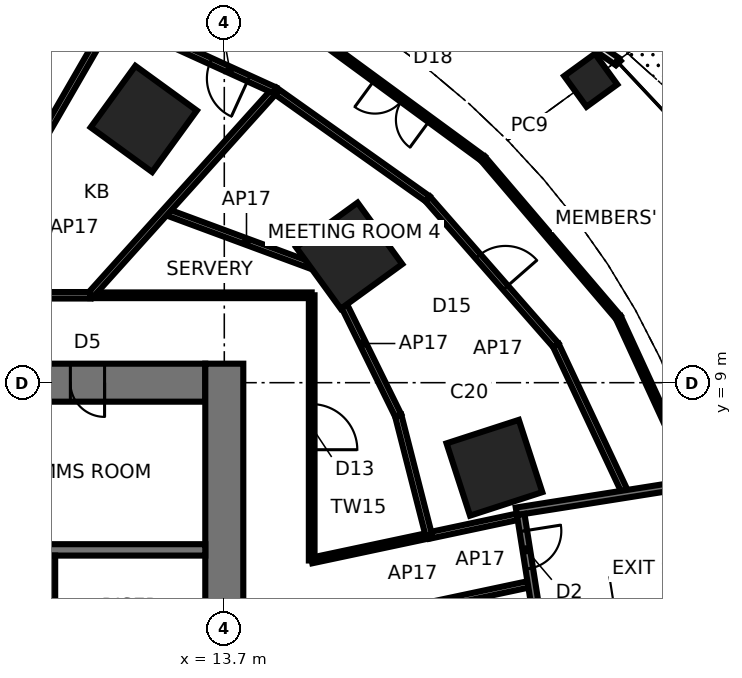
"""IFC4 building model, lengths in metres.
Left out: names, types, materials, properties, quantities, classifications, styles, units other than length and angle.
Written with IfcOpenShell. Run it as: python <this file> out.ifc"""

import sys

from ifc_helpers import new_model, si_unit, direction, frame, frame_2d, origin, origin_2d, place, context, subcontext, project, spatial, rectangle, extrude, element, fill, save


model = new_model("IFC4")
c1 = context("Model", 3, precision=1e-05, world=origin(), true_north=direction((0.0, 1.0)))
c2 = subcontext(c1, "Body", "Model", "MODEL_VIEW")
j1 = project(units=[si_unit("LENGTHUNIT", "METRE"), si_unit("PLANEANGLEUNIT", "RADIAN")], contexts=[c1])
p1 = place(None, origin())
s1 = spatial("IfcSite", under=j1, at=p1, CompositionType="ELEMENT")
p2 = place(p1, origin())
s2 = spatial("IfcBuilding", under=s1, at=p2, CompositionType="ELEMENT")
p3 = place(p2, frame((0.0, 0.0, 15.1)))
s3 = spatial("IfcBuildingStorey", under=s2, at=p3, CompositionType="ELEMENT", Elevation=15.1)
for number, where, z_axis, x_axis in (
    (1, (20.808, 6.761, 0.0), (0.0, 0.0, 1.0), (0.951, 0.309, 0.0)),
    (2, (16.986, 12.341, 0.0), (0.0, 0.0, 1.0), (0.809, 0.588, 0.0)),
    (3, (11.581, 15.94, 0.0), (0.0, 0.0, 1.0), (0.588, 0.809, 0.0)),
):
    element("IfcColumn", number, at=place(p3, frame(where, z_axis=z_axis, x_axis=x_axis)), inside=s3, PredefinedType="COLUMN", context=c2, shape_type="SweptSolid", body=[
        extrude(rectangle(XDim=2.0, YDim=2.0, at=origin_2d()), origin(), (0.0, 0.0, 1.0), 4.5),
    ])
p4 = place(p3, frame((23.342, 16.959, 0.0), z_axis=(0.0, 0.0, 1.0), x_axis=(0.809016994375, 0.587785252292, 0.0)))
e4 = element("IfcColumn", 4, at=p4, inside=s3, PredefinedType="COLUMN", context=c2, shape_type="SweptSolid", body=[
    extrude(rectangle(XDim=1.0, YDim=1.0, at=origin_2d()), origin(), (0.0, 0.0, 1.0), 4.5),
])
p5 = place(p3, frame((13.2, 9.0, 0.0), z_axis=(0.0, 0.0, 1.0), x_axis=(-1.0, 0.0, 0.0)))
e5 = element("IfcWall", 5, at=p5, inside=s3, PredefinedType="SHEAR", context=c2, shape_type="SweptSolid", body=[
    extrude(rectangle(XDim=26.4, YDim=1.0, at=frame_2d((13.2, 0.0))), origin(), (0.0, 0.0, 1.0), 4.5),
])
p6 = place(p5, frame((2.65, 0.0, 0.0)))
e6 = element("IfcOpeningElement", 6, at=p6, cuts=e5, PredefinedType="OPENING", context=c2, shape_type="SweptSolid", body=[
    extrude(rectangle(XDim=0.9, YDim=2.1, at=frame_2d((0.45, 1.05))), frame((0.0, 0.51, 0.0), z_axis=(0.0, -1.0, 0.0), x_axis=(1.0, 0.0, 0.0)), (0.0, 0.0, 1.0), 1.02),
])
p7 = place(p5, frame((9.5, 0.0, 0.0)))
e7 = element("IfcOpeningElement", 7, at=p7, cuts=e5, PredefinedType="OPENING", context=c2, shape_type="SweptSolid", body=[
    extrude(rectangle(XDim=0.9, YDim=2.1, at=frame_2d((0.45, 1.05))), frame((0.0, 0.51, 0.0), z_axis=(0.0, -1.0, 0.0), x_axis=(1.0, 0.0, 0.0)), (0.0, 0.0, 1.0), 1.02),
])
p8 = place(p5, frame((16.0, 0.0, 0.0)))
e8 = element("IfcOpeningElement", 8, at=p8, cuts=e5, PredefinedType="OPENING", context=c2, shape_type="SweptSolid", body=[
    extrude(rectangle(XDim=0.9, YDim=2.1, at=frame_2d((0.45, 1.05))), frame((0.0, 0.51, 0.0), z_axis=(0.0, -1.0, 0.0), x_axis=(1.0, 0.0, 0.0)), (0.0, 0.0, 1.0), 1.02),
])
p9 = place(p5, frame((21.25, 0.0, 0.0)))
e9 = element("IfcOpeningElement", 9, at=p9, cuts=e5, PredefinedType="OPENING", context=c2, shape_type="SweptSolid", body=[
    extrude(rectangle(XDim=0.9, YDim=2.1, at=frame_2d((0.45, 1.05))), frame((0.0, 0.51, 0.0), z_axis=(0.0, -1.0, 0.0), x_axis=(1.0, 0.0, 0.0)), (0.0, 0.0, 1.0), 1.02),
])
p10 = place(p5, frame((24.8, 0.0, 0.0)))
e10 = element("IfcOpeningElement", 10, at=p10, cuts=e5, PredefinedType="OPENING", context=c2, shape_type="SweptSolid", body=[
    extrude(rectangle(XDim=1.0, YDim=2.1, at=frame_2d((0.5, 1.05))), frame((0.0, 0.51, 0.0), z_axis=(0.0, -1.0, 0.0), x_axis=(1.0, 0.0, 0.0)), (0.0, 0.0, 1.0), 1.02),
])
p11 = place(p3, frame((13.7, -9.5, 0.0), z_axis=(0.0, 0.0, 1.0), x_axis=(0.0, 1.0, 0.0)))
e11 = element("IfcWall", 11, at=p11, inside=s3, PredefinedType="SHEAR", context=c2, shape_type="SweptSolid", body=[
    extrude(rectangle(XDim=19.0, YDim=1.0, at=frame_2d((9.5, 0.0))), origin(), (0.0, 0.0, 1.0), 4.5),
])
p12 = place(p11, frame((8.6, 0.0, 0.0)))
e12 = element("IfcOpeningElement", 12, at=p12, cuts=e11, PredefinedType="OPENING", context=c2, shape_type="SweptSolid", body=[
    extrude(rectangle(XDim=1.8, YDim=2.4, at=frame_2d((0.9, 1.2))), frame((0.0, 0.51, 0.0), z_axis=(0.0, -1.0, 0.0), x_axis=(1.0, 0.0, 0.0)), (0.0, 0.0, 1.0), 1.02),
])
p13 = place(p3, frame((-13.2, 4.6, 0.0), z_axis=(0.0, 0.0, 1.0), x_axis=(1.0, 0.0, 0.0)))
e13 = element("IfcWall", 13, at=p13, inside=s3, PredefinedType="SHEAR", context=c2, shape_type="SweptSolid", body=[
    extrude(rectangle(XDim=26.4, YDim=0.3, at=frame_2d((13.2, 0.0))), origin(), (0.0, 0.0, 1.0), 4.5),
])
p14 = place(p3, frame((9.1, 1.75, 0.0), z_axis=(0.0, 0.0, 1.0), x_axis=(0.0, 1.0, 0.0)))
e14 = element("IfcWall", 14, at=p14, inside=s3, PredefinedType="SHEAR", context=c2, shape_type="SweptSolid", body=[
    extrude(rectangle(XDim=2.7, YDim=0.3, at=frame_2d((1.35, 0.0))), origin(), (0.0, 0.0, 1.0), 4.5),
])
p15 = place(p3, frame((24.03, 17.459, 0.0), z_axis=(0.0, 0.0, 1.0), x_axis=(-0.821240808498, 0.570581750897, 0.0)))
e15 = element("IfcWall", 15, at=p15, inside=s3, PredefinedType="SOLIDWALL", context=c2, shape_type="SweptSolid", body=[
    extrude(rectangle(XDim=6.225, YDim=0.2, at=frame_2d((3.112, 0.0))), origin(), (0.0, 0.0, 1.0), 4.3),
])
p16 = place(p15, frame((4.825, 0.0, 0.0)))
e16 = element("IfcOpeningElement", 16, at=p16, cuts=e15, PredefinedType="OPENING", context=c2, shape_type="SweptSolid", body=[
    extrude(rectangle(XDim=1.0, YDim=2.4, at=frame_2d((0.5, 1.2))), frame((0.0, 0.11, 0.0), z_axis=(0.0, -1.0, 0.0), x_axis=(1.0, 0.0, 0.0)), (0.0, 0.0, 1.0), 0.22),
])
p17 = place(p15, frame((3.725, 0.0, 0.3)))
e17 = element("IfcOpeningElement", 17, at=p17, cuts=e15, PredefinedType="OPENING", context=c2, shape_type="SweptSolid", body=[
    extrude(rectangle(XDim=0.9, YDim=2.1, at=frame_2d((0.45, 1.05))), frame((0.0, 0.11, 0.0), z_axis=(0.0, -1.0, 0.0), x_axis=(1.0, 0.0, 0.0)), (0.0, 0.0, 1.0), 0.22),
])
p18 = place(p15, frame((4.825, 0.0, 2.7)))
e18 = element("IfcOpeningElement", 18, at=p18, cuts=e15, PredefinedType="OPENING", context=c2, shape_type="SweptSolid", body=[
    extrude(rectangle(XDim=1.0, YDim=0.6, at=frame_2d((0.5, 0.3))), frame((0.0, 0.11, 0.0), z_axis=(0.0, -1.0, 0.0), x_axis=(1.0, 0.0, 0.0)), (0.0, 0.0, 1.0), 0.22),
])
p19 = place(p3, frame((16.0, 2.481, 0.0), z_axis=(0.0, 0.0, 1.0), x_axis=(0.978144448143, 0.207926522038, 0.0)))
e19 = element("IfcWall", 19, at=p19, inside=s3, PredefinedType="PARTITIONING", context=c2, shape_type="SweptSolid", body=[
    extrude(rectangle(XDim=5.817, YDim=0.17, at=frame_2d((2.908, 0.0))), origin(), (0.0, 0.0, 1.0), 4.3),
])
p20 = place(p3, frame((21.408, 5.47, 0.0), z_axis=(0.0, 0.0, 1.0), x_axis=(-0.978137955861, -0.207957061204, 0.0)))
e20 = element("IfcWall", 20, at=p20, inside=s3, PredefinedType="PARTITIONING", context=c2, shape_type="SweptSolid", body=[
    extrude(rectangle(XDim=2.376, YDim=0.17, at=frame_2d((1.188, 0.0))), origin(), (0.0, 0.0, 1.0), 4.3),
])
p21 = place(p3, frame((19.083, 4.976, 0.0), z_axis=(0.0, 0.0, 1.0), x_axis=(-0.978156882567, -0.207868018433, 0.0)))
e21 = element("IfcWall", 21, at=p21, inside=s3, PredefinedType="PARTITIONING", context=c2, shape_type="SweptSolid", body=[
    extrude(rectangle(XDim=3.152, YDim=0.15, at=frame_2d((1.576, 0.0))), origin(), (0.0, 0.0, 1.0), 4.3),
])
p22 = place(p3, frame((26.032, 6.452, 0.0), z_axis=(0.0, 0.0, 1.0), x_axis=(-0.417854101211, 0.908514144139, 0.0)))
e22 = element("IfcWall", 22, at=p22, inside=s3, PredefinedType="PARTITIONING", context=c2, shape_type="SweptSolid", body=[
    extrude(rectangle(XDim=4.695, YDim=0.15, at=frame_2d((2.347, 0.0))), origin(), (0.0, 0.0, 1.0), 4.3),
])
p23 = place(p3, frame((22.426, 9.985, 0.0), z_axis=(0.0, 0.0, 1.0), x_axis=(0.425473889508, -0.904970700822, 0.0)))
e23 = element("IfcWall", 23, at=p23, inside=s3, PredefinedType="PARTITIONING", context=c2, shape_type="SweptSolid", body=[
    extrude(rectangle(XDim=4.221, YDim=0.17, at=frame_2d((2.11, 0.0))), origin(), (0.0, 0.0, 1.0), 4.3),
])
p24 = place(p3, frame((18.276, 8.137, 0.0), z_axis=(0.0, 0.0, 1.0), x_axis=(0.247568605717, -0.968870365665, 0.0)))
e24 = element("IfcWall", 24, at=p24, inside=s3, PredefinedType="PARTITIONING", context=c2, shape_type="SweptSolid", body=[
    extrude(rectangle(XDim=3.262, YDim=0.17, at=frame_2d((1.631, 0.0))), origin(), (0.0, 0.0, 1.0), 4.3),
])
p25 = place(p3, frame((16.0, 4.321, 0.0), z_axis=(0.0, 0.0, 1.0), x_axis=(0.0, 1.0, 0.0)))
e25 = element("IfcWall", 25, at=p25, inside=s3, PredefinedType="PARTITIONING", context=c2, shape_type="SweptSolid", body=[
    extrude(rectangle(XDim=6.979, YDim=0.15, at=frame_2d((3.49, 0.0))), origin(), (0.0, 0.0, 1.0), 4.3),
])
p26 = place(p25, frame((2.915, 0.0, 0.0)))
e26 = element("IfcOpeningElement", 26, at=p26, cuts=e25, PredefinedType="OPENING", context=c2, shape_type="SweptSolid", body=[
    extrude(rectangle(XDim=1.2, YDim=2.4, at=frame_2d((0.6, 1.2))), frame((0.0, 0.085, 0.0), z_axis=(0.0, -1.0, 0.0), x_axis=(1.0, 0.0, 0.0)), (0.0, 0.0, 1.0), 0.17),
])
p27 = place(p3, frame((19.049, 13.84, 0.0), z_axis=(0.0, 0.0, 1.0), x_axis=(0.658801352576, -0.752316939756, 0.0)))
e27 = element("IfcWall", 27, at=p27, inside=s3, PredefinedType="PARTITIONING", context=c2, shape_type="SweptSolid", body=[
    extrude(rectangle(XDim=5.125, YDim=0.17, at=frame_2d((2.562, 0.0))), origin(), (0.0, 0.0, 1.0), 4.3),
])
p28 = place(p27, frame((2.012, 0.0, 0.0)))
e28 = element("IfcOpeningElement", 28, at=p28, cuts=e27, PredefinedType="OPENING", context=c2, shape_type="SweptSolid", body=[
    extrude(rectangle(XDim=1.1, YDim=2.4, at=frame_2d((0.55, 1.2))), frame((0.0, 0.095, 0.0), z_axis=(0.0, -1.0, 0.0), x_axis=(1.0, 0.0, 0.0)), (0.0, 0.0, 1.0), 0.19),
])
p29 = place(p3, frame((24.07, 10.717, 0.0), z_axis=(0.0, 0.0, 1.0), x_axis=(-0.648732488568, 0.761016529569, 0.0)))
e29 = element("IfcWall", 29, at=p29, inside=s3, PredefinedType="PARTITIONING", context=c2, shape_type="SweptSolid", body=[
    extrude(rectangle(XDim=5.494, YDim=0.15, at=frame_2d((2.747, 0.0))), origin(), (0.0, 0.0, 1.0), 4.3),
])
p30 = place(p3, frame((16.413, 11.925, 0.0), z_axis=(0.0, 0.0, 1.0), x_axis=(0.44142043443, -0.897300395669, 0.0)))
e30 = element("IfcWall", 30, at=p30, inside=s3, PredefinedType="PARTITIONING", context=c2, shape_type="SweptSolid", body=[
    extrude(rectangle(XDim=4.221, YDim=0.17, at=frame_2d((2.111, 0.0))), origin(), (0.0, 0.0, 1.0), 4.3),
])
p31 = place(p3, frame((16.0, 11.3, 0.0), z_axis=(0.0, 0.0, 1.0), x_axis=(-1.0, 0.0, 0.0)))
e31 = element("IfcWall", 31, at=p31, inside=s3, PredefinedType="PARTITIONING", context=c2, shape_type="SweptSolid", body=[
    extrude(rectangle(XDim=5.825, YDim=0.15, at=frame_2d((2.913, 0.0))), origin(), (0.0, 0.0, 1.0), 4.3),
])
p32 = place(p3, frame((12.156, 13.5, 0.0), z_axis=(0.0, 0.0, 1.0), x_axis=(0.937814922048, -0.34713566798, 0.0)))
e32 = element("IfcWall", 32, at=p32, inside=s3, PredefinedType="PARTITIONING", context=c2, shape_type="SweptSolid", body=[
    extrude(rectangle(XDim=4.539, YDim=0.17, at=frame_2d((2.27, 0.0))), origin(), (0.0, 0.0, 1.0), 4.3),
])
p33 = place(p3, frame((15.029, 16.692, 0.0), z_axis=(0.0, 0.0, 1.0), x_axis=(0.815613464498, -0.578597162566, 0.0)))
e33 = element("IfcWall", 33, at=p33, inside=s3, PredefinedType="PARTITIONING", context=c2, shape_type="SweptSolid", body=[
    extrude(rectangle(XDim=4.929, YDim=0.17, at=frame_2d((2.464, 0.0))), origin(), (0.0, 0.0, 1.0), 4.3),
])
p34 = place(p3, frame((20.506, 14.898, 0.0), z_axis=(0.0, 0.0, 1.0), x_axis=(-0.806517819775, 0.591209782045, 0.0)))
e34 = element("IfcWall", 34, at=p34, inside=s3, PredefinedType="PARTITIONING", context=c2, shape_type="SweptSolid", body=[
    extrude(rectangle(XDim=5.296, YDim=0.15, at=frame_2d((2.648, 0.0))), origin(), (0.0, 0.0, 1.0), 4.3),
])
p35 = place(p34, frame((1.723, 0.0, 0.0)))
e35 = element("IfcOpeningElement", 35, at=p35, cuts=e34, PredefinedType="OPENING", context=c2, shape_type="SweptSolid", body=[
    extrude(rectangle(XDim=1.8, YDim=2.4, at=frame_2d((0.9, 1.2))), frame((0.0, 0.085, 0.0), z_axis=(0.0, -1.0, 0.0), x_axis=(1.0, 0.0, 0.0)), (0.0, 0.0, 1.0), 0.17),
])
p36 = place(p3, frame((15.029, 16.692, 0.0), z_axis=(0.0, 0.0, 1.0), x_axis=(-0.669122739593, -0.74315190867, 0.0)))
e36 = element("IfcWall", 36, at=p36, inside=s3, PredefinedType="PARTITIONING", context=c2, shape_type="SweptSolid", body=[
    extrude(rectangle(XDim=7.255, YDim=0.17, at=frame_2d((3.628, 0.0))), origin(), (0.0, 0.0, 1.0), 4.3),
])
p37 = place(p3, frame((10.175, 11.3, 0.0), z_axis=(0.0, 0.0, 1.0), x_axis=(-1.0, 0.0, 0.0)))
e37 = element("IfcWall", 37, at=p37, inside=s3, PredefinedType="PARTITIONING", context=c2, shape_type="SweptSolid", body=[
    extrude(rectangle(XDim=3.65, YDim=0.17, at=frame_2d((1.825, 0.0))), origin(), (0.0, 0.0, 1.0), 4.3),
])
p38 = place(p3, frame((10.761, 18.639, 0.0), z_axis=(0.0, 0.0, 1.0), x_axis=(0.909832836999, -0.414974949507, 0.0)))
e38 = element("IfcWall", 38, at=p38, inside=s3, PredefinedType="PARTITIONING", context=c2, shape_type="SweptSolid", body=[
    extrude(rectangle(XDim=4.691, YDim=0.17, at=frame_2d((2.346, 0.0))), origin(), (0.0, 0.0, 1.0), 4.3),
])
p39 = place(p38, frame((2.836, 0.0, 0.0)))
e39 = element("IfcOpeningElement", 39, at=p39, cuts=e38, PredefinedType="OPENING", context=c2, shape_type="SweptSolid", body=[
    extrude(rectangle(XDim=1.1, YDim=2.4, at=frame_2d((0.55, 1.2))), frame((0.0, 0.095, 0.0), z_axis=(0.0, -1.0, 0.0), x_axis=(1.0, 0.0, 0.0)), (0.0, 0.0, 1.0), 0.19),
])
p40 = place(p3, frame((6.524, 11.3, 0.0), z_axis=(0.0, 0.0, 1.0), x_axis=(0.499987645576, 0.866032536497, 0.0)))
e40 = element("IfcWall", 40, at=p40, inside=s3, PredefinedType="PARTITIONING", context=c2, shape_type="SweptSolid", body=[
    extrude(rectangle(XDim=8.474, YDim=0.17, at=frame_2d((4.237, 0.0))), origin(), (0.0, 0.0, 1.0), 4.3),
])
p41 = place(p3, frame((21.385, 5.615, 0.0), z_axis=(0.0, 0.0, 1.0), x_axis=(0.987689398324, 0.156427786655, 0.0)))
e41 = element("IfcWall", 41, at=p41, inside=s3, PredefinedType="SOLIDWALL", context=c2, shape_type="SweptSolid", body=[
    extrude(rectangle(XDim=8.3, YDim=0.2, at=frame_2d((4.15, 0.0))), origin(), (0.0, 0.0, 1.0), 4.25),
])
p42 = place(p3, frame((22.156, 1.383, 0.0), z_axis=(0.0, 0.0, 1.0), x_axis=(-0.156428225752, 0.987689328781, 0.0)))
e42 = element("IfcWall", 42, at=p42, inside=s3, PredefinedType="SOLIDWALL", context=c2, shape_type="SweptSolid", body=[
    extrude(rectangle(XDim=4.2, YDim=0.2, at=frame_2d((2.1, 0.0))), origin(), (0.0, 0.0, 1.0), 4.25),
])
p43 = place(p42, frame((2.76, 0.0, 0.0)))
e43 = element("IfcOpeningElement", 43, at=p43, cuts=e42, PredefinedType="OPENING", context=c2, shape_type="SweptSolid", body=[
    extrude(rectangle(XDim=1.0, YDim=2.1, at=frame_2d((0.5, 1.05))), frame((0.0, 0.11, 0.0), z_axis=(0.0, -1.0, 0.0), x_axis=(1.0, 0.0, 0.0)), (0.0, 0.0, 1.0), 0.22),
])
p44 = place(p6, origin())
e44 = element("IfcDoor", 44, at=p44, inside=s3, OperationType="SINGLE_SWING_LEFT", PredefinedType="DOOR", context=c2, shape_type="SweptSolid", body=[
    extrude(rectangle(XDim=0.82, YDim=2.06, at=frame_2d((0.45, 1.03))), frame((0.0, 0.025, 0.0), z_axis=(0.0, -1.0, 0.0), x_axis=(1.0, 0.0, 0.0)), (0.0, 0.0, 1.0), 0.05),
    extrude(rectangle(XDim=0.04, YDim=2.1, at=frame_2d((0.02, 1.05))), frame((0.0, 0.25, 0.0), z_axis=(0.0, -1.0, 0.0), x_axis=(1.0, 0.0, 0.0)), (0.0, 0.0, 1.0), 0.5),
    extrude(rectangle(XDim=0.04, YDim=2.1, at=frame_2d((0.88, 1.05))), frame((0.0, 0.25, 0.0), z_axis=(0.0, -1.0, 0.0), x_axis=(1.0, 0.0, 0.0)), (0.0, 0.0, 1.0), 0.5),
    extrude(rectangle(XDim=0.82, YDim=0.04, at=frame_2d((0.45, 2.08))), frame((0.0, 0.25, 0.0), z_axis=(0.0, -1.0, 0.0), x_axis=(1.0, 0.0, 0.0)), (0.0, 0.0, 1.0), 0.5),
])
fill(e6, e44)
p45 = place(p39, frame((1.1, 0.0, 0.0), z_axis=(0.0, 0.0, 1.0), x_axis=(-1.0, 0.0, 0.0)))
e45 = element("IfcDoor", 45, at=p45, inside=s3, OperationType="SINGLE_SWING_LEFT", PredefinedType="DOOR", context=c2, shape_type="SweptSolid", body=[
    extrude(rectangle(XDim=1.1, YDim=2.4, at=frame_2d((0.55, 1.2))), frame((0.0, 0.025, 0.0), z_axis=(0.0, -1.0, 0.0), x_axis=(1.0, 0.0, 0.0)), (0.0, 0.0, 1.0), 0.05),
])
fill(e39, e45)
p46 = place(p26, frame((1.2, 0.0, 0.0), z_axis=(0.0, 0.0, 1.0), x_axis=(-1.0, 0.0, 0.0)))
e46 = element("IfcDoor", 46, at=p46, inside=s3, OperationType="SINGLE_SWING_RIGHT", PredefinedType="DOOR", context=c2, shape_type="SweptSolid", body=[
    extrude(rectangle(XDim=1.2, YDim=2.4, at=frame_2d((0.6, 1.2))), frame((0.0, 0.025, 0.0), z_axis=(0.0, -1.0, 0.0), x_axis=(1.0, 0.0, 0.0)), (0.0, 0.0, 1.0), 0.05),
])
fill(e26, e46)
p47 = place(p28, origin())
e47 = element("IfcDoor", 47, at=p47, inside=s3, OperationType="SINGLE_SWING_RIGHT", PredefinedType="DOOR", context=c2, shape_type="SweptSolid", body=[
    extrude(rectangle(XDim=1.1, YDim=2.4, at=frame_2d((0.55, 1.2))), frame((0.0, 0.025, 0.0), z_axis=(0.0, -1.0, 0.0), x_axis=(1.0, 0.0, 0.0)), (0.0, 0.0, 1.0), 0.05),
])
fill(e28, e47)
p48 = place(p35, origin())
e48 = element("IfcDoor", 48, at=p48, inside=s3, OperationType="DOUBLE_DOOR_SINGLE_SWING", PredefinedType="DOOR", context=c2, shape_type="SweptSolid", body=[
    extrude(rectangle(XDim=1.8, YDim=2.4, at=frame_2d((0.9, 1.2))), frame((0.0, 0.025, 0.0), z_axis=(0.0, -1.0, 0.0), x_axis=(1.0, 0.0, 0.0)), (0.0, 0.0, 1.0), 0.05),
])
fill(e35, e48)
p49 = place(p43, frame((1.0, 0.0, 0.0), z_axis=(0.0, 0.0, 1.0), x_axis=(-1.0, 0.0, 0.0)))
e49 = element("IfcDoor", 49, at=p49, inside=s3, OperationType="SINGLE_SWING_LEFT", PredefinedType="DOOR", context=c2, shape_type="SweptSolid", body=[
    extrude(rectangle(XDim=1.0, YDim=2.1, at=frame_2d((0.5, 1.05))), frame((0.0, 0.025, 0.0), z_axis=(0.0, -1.0, 0.0), x_axis=(1.0, 0.0, 0.0)), (0.0, 0.0, 1.0), 0.05),
])
fill(e43, e49)
save(model, sys.argv[1])
